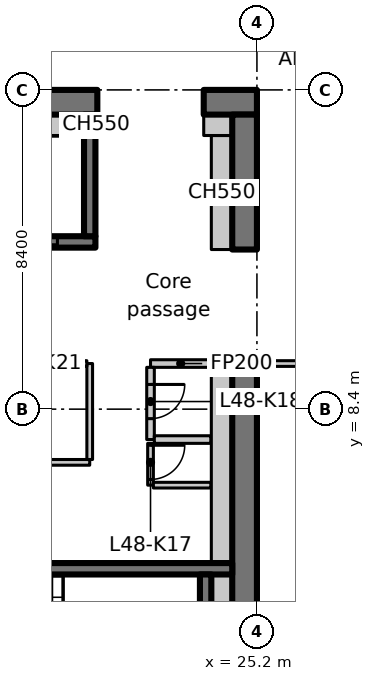
"""IFC4 building model, lengths in metres.
Left out: names, types, materials, properties, quantities, classifications, styles, units other than length and angle.
Written with IfcOpenShell. Run it as: python <this file> out.ifc"""

import sys

from ifc_helpers import new_model, si_unit, direction, frame, frame_2d, origin, place, context, subcontext, project, spatial, rectangle, extrude, element, fill, save


model = new_model("IFC4")
c1 = context("Model", 3, precision=1e-05, world=origin(), true_north=direction((0.0, 1.0)))
c2 = subcontext(c1, "Body", "Model", "MODEL_VIEW")
j1 = project(units=[si_unit("LENGTHUNIT", "METRE"), si_unit("PLANEANGLEUNIT", "RADIAN")], contexts=[c1])
p1 = place(None, origin())
s1 = spatial("IfcSite", under=j1, at=p1, CompositionType="ELEMENT")
p2 = place(p1, origin())
s2 = spatial("IfcBuilding", under=s1, at=p2, CompositionType="ELEMENT")
p3 = place(p2, frame((0.0, 0.0, 192.0)))
s3 = spatial("IfcBuildingStorey", under=s2, at=p3, CompositionType="ELEMENT", Elevation=192.0)
p4 = place(p3, frame((-1.1, 16.475, 0.0), z_axis=(0.0, 0.0, 1.0), x_axis=(1.0, 0.0, 0.0)))
e1 = element("IfcWall", 1, at=p4, inside=s3, PredefinedType="SHEAR", context=c2, shape_type="SweptSolid", body=[
    extrude(rectangle(XDim=22.1, YDim=0.65, at=frame_2d((11.05, 0.0))), origin(), (0.0, 0.0, 1.0), 3.35),
])
p5 = place(p4, frame((3.15, 0.0, 0.0)))
e2 = element("IfcOpeningElement", 2, at=p5, cuts=e1, PredefinedType="OPENING", context=c2, shape_type="SweptSolid", body=[
    extrude(rectangle(XDim=1.1, YDim=2.3, at=frame_2d((0.55, 1.15))), frame((0.0, 0.335, 0.0), z_axis=(0.0, -1.0, 0.0), x_axis=(1.0, 0.0, 0.0)), (0.0, 0.0, 1.0), 0.67),
])
p6 = place(p3, frame((23.8, 16.475, 0.0), z_axis=(0.0, 0.0, 1.0), x_axis=(1.0, 0.0, 0.0)))
e3 = element("IfcWall", 3, at=p6, inside=s3, PredefinedType="SHEAR", context=c2, shape_type="SweptSolid", body=[
    extrude(rectangle(XDim=1.4, YDim=0.65, at=frame_2d((0.7, 0.0))), origin(), (0.0, 0.0, 1.0), 3.35),
])
p7 = place(p3, frame((24.875, 0.65, 0.0), z_axis=(0.0, 0.0, 1.0), x_axis=(0.0, 1.0, 0.0)))
e4 = element("IfcWall", 4, at=p7, inside=s3, PredefinedType="SHEAR", context=c2, shape_type="SweptSolid", body=[
    extrude(rectangle(XDim=9.15, YDim=0.65, at=frame_2d((4.575, 0.0))), origin(), (0.0, 0.0, 1.0), 3.35),
])
p8 = place(p3, frame((24.875, 12.6, 0.0), z_axis=(0.0, 0.0, 1.0), x_axis=(0.0, 1.0, 0.0)))
e5 = element("IfcWall", 5, at=p8, inside=s3, PredefinedType="SHEAR", context=c2, shape_type="SweptSolid", body=[
    extrude(rectangle(XDim=3.55, YDim=0.65, at=frame_2d((1.775, 0.0))), origin(), (0.0, 0.0, 1.0), 3.35),
])
p9 = place(p3, frame((24.275, 12.6, 0.0), z_axis=(0.0, 0.0, 1.0), x_axis=(0.0, 1.0, 0.0)))
e6 = element("IfcWall", 6, at=p9, inside=s3, PredefinedType="PARTITIONING", context=c2, shape_type="SweptSolid", body=[
    extrude(rectangle(XDim=3.0, YDim=0.55, at=frame_2d((1.5, 0.0))), origin(), (0.0, 0.0, 1.0), 3.35),
])
p10 = place(p3, frame((23.8, 15.875, 0.0), z_axis=(0.0, 0.0, 1.0), x_axis=(1.0, 0.0, 0.0)))
e7 = element("IfcWall", 7, at=p10, inside=s3, PredefinedType="PARTITIONING", context=c2, shape_type="SweptSolid", body=[
    extrude(rectangle(XDim=0.75, YDim=0.55, at=frame_2d((0.375, 0.0))), origin(), (0.0, 0.0, 1.0), 3.35),
])
p11 = place(p3, frame((17.85, 12.8, 0.0), z_axis=(0.0, 0.0, 1.0), x_axis=(1.0, 0.0, 0.0)))
e8 = element("IfcWall", 8, at=p11, inside=s3, PredefinedType="SHEAR", context=c2, shape_type="SweptSolid", body=[
    extrude(rectangle(XDim=3.1, YDim=0.3, at=frame_2d((1.55, 0.0))), origin(), (0.0, 0.0, 1.0), 3.35),
])
p12 = place(p11, frame((1.0, 0.0, 0.0)))
e9 = element("IfcOpeningElement", 9, at=p12, cuts=e8, PredefinedType="OPENING", context=c2, shape_type="SweptSolid", body=[
    extrude(rectangle(XDim=1.1, YDim=2.3, at=frame_2d((0.55, 1.15))), frame((0.0, 0.16, 0.0), z_axis=(0.0, -1.0, 0.0), x_axis=(1.0, 0.0, 0.0)), (0.0, 0.0, 1.0), 0.32),
])
p13 = place(p3, frame((20.8, 12.95, 0.0), z_axis=(0.0, 0.0, 1.0), x_axis=(0.0, 1.0, 0.0)))
e10 = element("IfcWall", 10, at=p13, inside=s3, PredefinedType="SHEAR", context=c2, shape_type="SweptSolid", body=[
    extrude(rectangle(XDim=3.2, YDim=0.3, at=frame_2d((1.6, 0.0))), origin(), (0.0, 0.0, 1.0), 3.35),
])
p14 = place(p3, frame((15.8, 4.2, 0.0), z_axis=(0.0, 0.0, 1.0), x_axis=(1.0, 0.0, 0.0)))
e11 = element("IfcWall", 11, at=p14, inside=s3, PredefinedType="SHEAR", context=c2, shape_type="SweptSolid", body=[
    extrude(rectangle(XDim=8.75, YDim=0.3, at=frame_2d((4.375, 0.0))), origin(), (0.0, 0.0, 1.0), 3.35),
])
p15 = place(p14, frame((0.4, 0.0, 0.0)))
e12 = element("IfcOpeningElement", 12, at=p15, cuts=e11, PredefinedType="OPENING", context=c2, shape_type="SweptSolid", body=[
    extrude(rectangle(XDim=1.0, YDim=2.1, at=frame_2d((0.5, 1.05))), frame((0.0, 0.16, 0.0), z_axis=(0.0, -1.0, 0.0), x_axis=(1.0, 0.0, 0.0)), (0.0, 0.0, 1.0), 0.32),
])
p16 = place(p3, frame((23.85, 1.5, 0.0), z_axis=(0.0, 0.0, 1.0), x_axis=(0.0, 1.0, 0.0)))
e13 = element("IfcWall", 13, at=p16, inside=s3, PredefinedType="SHEAR", context=c2, shape_type="SweptSolid", body=[
    extrude(rectangle(XDim=2.55, YDim=0.3, at=frame_2d((1.275, 0.0))), origin(), (0.0, 0.0, 1.0), 3.35),
])
p17 = place(p3, frame((23.988, 9.6, 0.0), z_axis=(0.0, 0.0, 1.0), x_axis=(-1.0, 0.0, 0.0)))
e14 = element("IfcWall", 14, at=p17, inside=s3, PredefinedType="PARTITIONING", context=c2, shape_type="SweptSolid", body=[
    extrude(rectangle(XDim=1.588, YDim=0.2, at=frame_2d((0.794, 0.0))), origin(), (0.0, 0.0, 1.0), 3.35),
])
p18 = place(p3, frame((22.4, 9.5, 0.0), z_axis=(0.0, 0.0, 1.0), x_axis=(0.0, -1.0, 0.0)))
e15 = element("IfcWall", 15, at=p18, inside=s3, PredefinedType="PARTITIONING", context=c2, shape_type="SweptSolid", body=[
    extrude(rectangle(XDim=1.9, YDim=0.2, at=frame_2d((0.95, 0.0))), origin(), (0.0, 0.0, 1.0), 3.35),
])
p19 = place(p18, frame((0.45, 0.0, 0.0)))
e16 = element("IfcOpeningElement", 16, at=p19, cuts=e15, PredefinedType="OPENING", context=c2, shape_type="SweptSolid", body=[
    extrude(rectangle(XDim=0.9, YDim=2.1, at=frame_2d((0.45, 1.05))), frame((0.0, 0.11, 0.0), z_axis=(0.0, -1.0, 0.0), x_axis=(1.0, 0.0, 0.0)), (0.0, 0.0, 1.0), 0.22),
])
p20 = place(p3, frame((22.5, 7.6, 0.0), z_axis=(0.0, 0.0, 1.0), x_axis=(1.0, 0.0, 0.0)))
e17 = element("IfcWall", 17, at=p20, inside=s3, PredefinedType="PARTITIONING", context=c2, shape_type="SweptSolid", body=[
    extrude(rectangle(XDim=1.488, YDim=0.2, at=frame_2d((0.744, 0.0))), origin(), (0.0, 0.0, 1.0), 3.35),
])
p21 = place(p3, frame((12.5, 7.0, 0.0), z_axis=(0.0, 0.0, 1.0), x_axis=(1.0, 0.0, 0.0)))
e18 = element("IfcWall", 18, at=p21, inside=s3, PredefinedType="PARTITIONING", context=c2, shape_type="SweptSolid", body=[
    extrude(rectangle(XDim=8.3, YDim=0.15, at=frame_2d((4.15, 0.0))), origin(), (0.0, 0.0, 1.0), 3.35),
])
p22 = place(p3, frame((20.8, 7.075, 0.0), z_axis=(0.0, 0.0, 1.0), x_axis=(0.0, 1.0, 0.0)))
e19 = element("IfcWall", 19, at=p22, inside=s3, PredefinedType="PARTITIONING", context=c2, shape_type="SweptSolid", body=[
    extrude(rectangle(XDim=2.525, YDim=0.15, at=frame_2d((1.263, 0.0))), origin(), (0.0, 0.0, 1.0), 3.35),
])
p23 = place(p3, frame((20.725, 9.6, 0.0), z_axis=(0.0, 0.0, 1.0), x_axis=(-1.0, 0.0, 0.0)))
e20 = element("IfcWall", 20, at=p23, inside=s3, PredefinedType="PARTITIONING", context=c2, shape_type="SweptSolid", body=[
    extrude(rectangle(XDim=8.225, YDim=0.15, at=frame_2d((4.113, 0.0))), origin(), (0.0, 0.0, 1.0), 3.35),
])
p24 = place(p23, frame((3.675, 0.0, 0.0)))
e21 = element("IfcOpeningElement", 21, at=p24, cuts=e20, PredefinedType="OPENING", context=c2, shape_type="SweptSolid", body=[
    extrude(rectangle(XDim=0.9, YDim=2.1, at=frame_2d((0.45, 1.05))), frame((0.0, 0.085, 0.0), z_axis=(0.0, -1.0, 0.0), x_axis=(1.0, 0.0, 0.0)), (0.0, 0.0, 1.0), 0.17),
])
p25 = place(p3, frame((22.4, 7.5, 0.0), z_axis=(0.0, 0.0, 1.0), x_axis=(0.0, -1.0, 0.0)))
e22 = element("IfcWall", 22, at=p25, inside=s3, PredefinedType="PARTITIONING", context=c2, shape_type="SweptSolid", body=[
    extrude(rectangle(XDim=1.1, YDim=0.15, at=frame_2d((0.55, 0.0))), origin(), (0.0, 0.0, 1.0), 3.35),
])
p26 = place(p25, frame((0.05, 0.0, 0.0)))
e23 = element("IfcOpeningElement", 23, at=p26, cuts=e22, PredefinedType="OPENING", context=c2, shape_type="SweptSolid", body=[
    extrude(rectangle(XDim=0.9, YDim=2.1, at=frame_2d((0.45, 1.05))), frame((0.0, 0.085, 0.0), z_axis=(0.0, -1.0, 0.0), x_axis=(1.0, 0.0, 0.0)), (0.0, 0.0, 1.0), 0.17),
])
p27 = place(p3, frame((22.475, 6.4, 0.0), z_axis=(0.0, 0.0, 1.0), x_axis=(1.0, 0.0, 0.0)))
e24 = element("IfcWall", 24, at=p27, inside=s3, PredefinedType="PARTITIONING", context=c2, shape_type="SweptSolid", body=[
    extrude(rectangle(XDim=1.513, YDim=0.15, at=frame_2d((0.756, 0.0))), origin(), (0.0, 0.0, 1.0), 3.35),
])
p28 = place(p3, frame((18.15, 15.875, 0.0), z_axis=(0.0, 0.0, 1.0), x_axis=(1.0, 0.0, 0.0)))
e25 = element("IfcWall", 25, at=p28, inside=s3, PredefinedType="PARTITIONING", context=c2, shape_type="SweptSolid", body=[
    extrude(rectangle(XDim=2.5, YDim=0.55, at=frame_2d((1.25, 0.0))), origin(), (0.0, 0.0, 1.0), 3.35),
])
p29 = place(p3, frame((20.95, 15.875, 0.0), z_axis=(0.0, 0.0, 1.0), x_axis=(1.0, 0.0, 0.0)))
e26 = element("IfcWall", 26, at=p29, inside=s3, PredefinedType="PARTITIONING", context=c2, shape_type="SweptSolid", body=[
    extrude(rectangle(XDim=0.05, YDim=0.55, at=frame_2d((0.025, 0.0))), origin(), (0.0, 0.0, 1.0), 3.35),
])
p30 = place(p3, frame((24.275, 1.5, 0.0), z_axis=(0.0, 0.0, 1.0), x_axis=(0.0, 1.0, 0.0)))
e27 = element("IfcWall", 27, at=p30, inside=s3, PredefinedType="PARTITIONING", context=c2, shape_type="SweptSolid", body=[
    extrude(rectangle(XDim=2.55, YDim=0.55, at=frame_2d((1.275, 0.0))), origin(), (0.0, 0.0, 1.0), 3.35),
])
p31 = place(p3, frame((24.275, 4.35, 0.0), z_axis=(0.0, 0.0, 1.0), x_axis=(0.0, 1.0, 0.0)))
e28 = element("IfcWall", 28, at=p31, inside=s3, PredefinedType="PARTITIONING", context=c2, shape_type="SweptSolid", body=[
    extrude(rectangle(XDim=5.45, YDim=0.55, at=frame_2d((2.725, 0.0))), origin(), (0.0, 0.0, 1.0), 3.35),
])
p32 = place(p3, frame((29.4, 9.6, 0.0), z_axis=(0.0, 0.0, 1.0), x_axis=(-1.0, 0.0, 0.0)))
e29 = element("IfcWall", 29, at=p32, inside=s3, PredefinedType="PARTITIONING", context=c2, shape_type="SweptSolid", body=[
    extrude(rectangle(XDim=4.2, YDim=0.15, at=frame_2d((2.1, 0.0))), origin(), (0.0, 0.0, 1.0), 3.33),
])
p33 = place(p12, origin())
e30 = element("IfcDoor", 30, at=p33, inside=s3, OperationType="SLIDING_TO_LEFT", PredefinedType="DOOR", context=c2, shape_type="SweptSolid", body=[
    extrude(rectangle(XDim=1.1, YDim=2.3, at=frame_2d((0.55, 1.15))), frame((0.0, 0.025, 0.0), z_axis=(0.0, -1.0, 0.0), x_axis=(1.0, 0.0, 0.0)), (0.0, 0.0, 1.0), 0.05),
])
fill(e9, e30)
p34 = place(p26, origin())
e31 = element("IfcDoor", 31, at=p34, inside=s3, OperationType="SINGLE_SWING_RIGHT", PredefinedType="DOOR", context=c2, shape_type="SweptSolid", body=[
    extrude(rectangle(XDim=0.9, YDim=2.1, at=frame_2d((0.45, 1.05))), frame((0.0, 0.025, 0.0), z_axis=(0.0, -1.0, 0.0), x_axis=(1.0, 0.0, 0.0)), (0.0, 0.0, 1.0), 0.05),
])
fill(e23, e31)
p35 = place(p19, origin())
e32 = element("IfcDoor", 32, at=p35, inside=s3, OperationType="SINGLE_SWING_LEFT", PredefinedType="DOOR", context=c2, shape_type="SweptSolid", body=[
    extrude(rectangle(XDim=0.9, YDim=2.1, at=frame_2d((0.45, 1.05))), frame((0.0, 0.025, 0.0), z_axis=(0.0, -1.0, 0.0), x_axis=(1.0, 0.0, 0.0)), (0.0, 0.0, 1.0), 0.05),
])
fill(e16, e32)
save(model, sys.argv[1])
